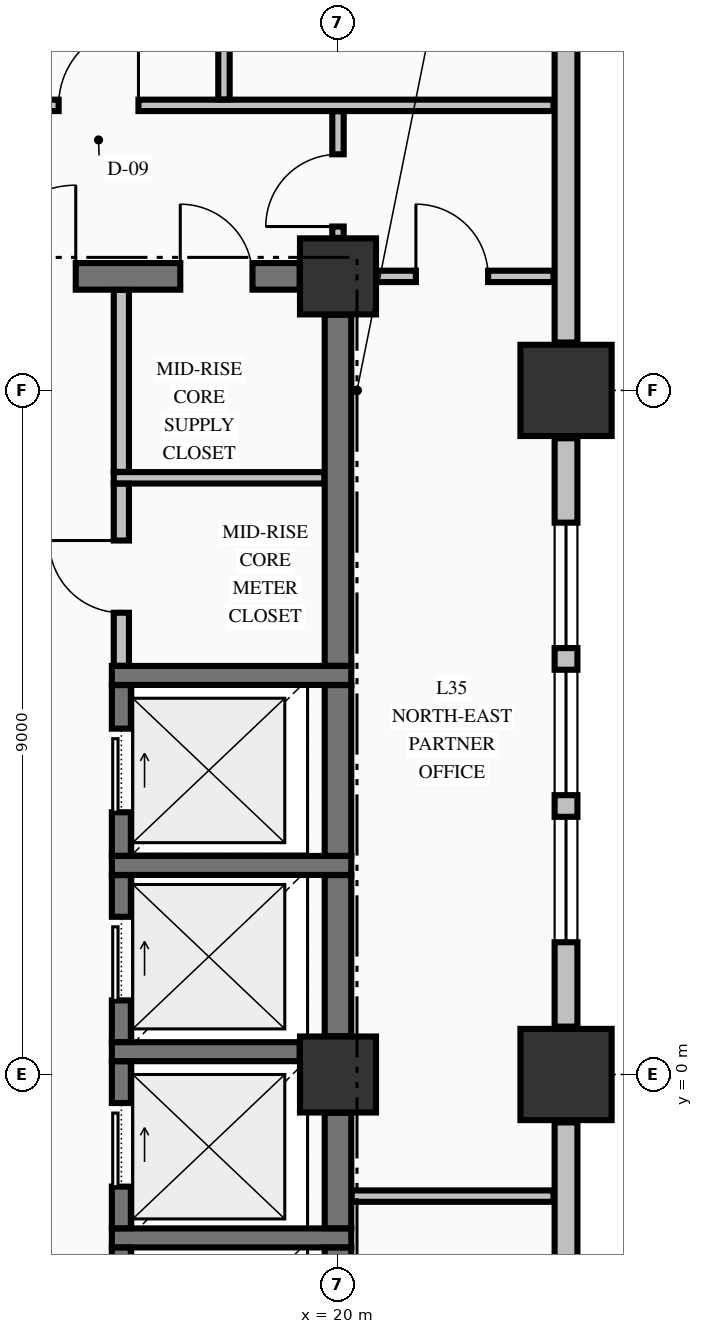
"""IFC4 building model, lengths in metres.
Left out: names, types, materials, properties, quantities, classifications, styles, units other than length and angle.
Written with IfcOpenShell. Run it as: python <this file> out.ifc"""

import sys

from ifc_helpers import new_model, si_unit, direction, frame, frame_2d, origin, origin_2d, place, context, subcontext, project, spatial, rectangle, extrude, element, fill, save


model = new_model("IFC4")
c1 = context("Model", 3, precision=1e-05, world=origin(), true_north=direction((0.0, 1.0)))
c2 = subcontext(c1, "Body", "Model", "MODEL_VIEW")
j1 = project(units=[si_unit("LENGTHUNIT", "METRE"), si_unit("PLANEANGLEUNIT", "RADIAN")], contexts=[c1])
p1 = place(None, origin())
s1 = spatial("IfcSite", under=j1, at=p1, CompositionType="ELEMENT")
p2 = place(p1, origin())
s2 = spatial("IfcBuilding", under=s1, at=p2, CompositionType="ELEMENT")
p3 = place(p2, frame((0.0, 0.0, 139.2)))
s3 = spatial("IfcBuildingStorey", under=s2, at=p3, CompositionType="ELEMENT", Elevation=139.2)
for number, where, z_axis, x_axis in (
    (1, (23.0, 0.0, -0.25), (0.0, 0.0, 1.0), (1.0, 0.0, 0.0)),
    (2, (23.0, 9.0, -0.25), (0.0, 0.0, 1.0), (1.0, 0.0, 0.0)),
):
    element("IfcColumn", number, at=place(p3, frame(where, z_axis=z_axis, x_axis=x_axis)), inside=s3, PredefinedType="COLUMN", context=c2, shape_type="SweptSolid", body=[
        extrude(rectangle(XDim=1.2, YDim=1.2, at=origin_2d()), origin(), (0.0, 0.0, 1.0), 3.495),
    ])
for number, where, z_axis, x_axis in (
    (3, (20.0, 10.5, -0.25), (0.0, 0.0, 1.0), (1.0, 0.0, 0.0)),
    (4, (20.0, 0.0, -0.25), (0.0, 0.0, 1.0), (1.0, 0.0, 0.0)),
):
    element("IfcColumn", number, at=place(p3, frame(where, z_axis=z_axis, x_axis=x_axis)), inside=s3, PredefinedType="COLUMN", context=c2, shape_type="SweptSolid", body=[
        extrude(rectangle(XDim=1.0, YDim=1.0, at=origin_2d()), origin(), (0.0, 0.0, 1.0), 3.495),
    ])
p4 = place(p3, frame((23.0, -8.37, 0.0), z_axis=(0.0, 0.0, 1.0), x_axis=(0.0, 1.0, 0.0)))
e5 = element("IfcWall", 5, at=p4, inside=s3, PredefinedType="STANDARD", context=c2, shape_type="SweptSolid", body=[
    extrude(rectangle(XDim=7.74, YDim=0.3, at=frame_2d((3.87, 0.0))), origin(), (0.0, 0.0, 1.0), 2.637),
])
p5 = place(p4, frame((1.11, 0.0, 0.8)))
e6 = element("IfcOpeningElement", 6, at=p5, cuts=e5, PredefinedType="OPENING", context=c2, shape_type="SweptSolid", body=[
    extrude(rectangle(XDim=1.65, YDim=1.7, at=frame_2d((0.825, 0.85))), frame((0.0, 0.16, 0.0), z_axis=(0.0, -1.0, 0.0), x_axis=(1.0, 0.0, 0.0)), (0.0, 0.0, 1.0), 0.32),
])
p6 = place(p4, frame((3.045, 0.0, 0.8)))
e7 = element("IfcOpeningElement", 7, at=p6, cuts=e5, PredefinedType="OPENING", context=c2, shape_type="SweptSolid", body=[
    extrude(rectangle(XDim=1.65, YDim=1.7, at=frame_2d((0.825, 0.85))), frame((0.0, 0.16, 0.0), z_axis=(0.0, -1.0, 0.0), x_axis=(1.0, 0.0, 0.0)), (0.0, 0.0, 1.0), 0.32),
])
p7 = place(p3, frame((23.0, 0.63, 0.0), z_axis=(0.0, 0.0, 1.0), x_axis=(0.0, 1.0, 0.0)))
e8 = element("IfcWall", 8, at=p7, inside=s3, PredefinedType="STANDARD", context=c2, shape_type="SweptSolid", body=[
    extrude(rectangle(XDim=7.74, YDim=0.3, at=frame_2d((3.87, 0.0))), origin(), (0.0, 0.0, 1.0), 2.637),
])
p8 = place(p7, frame((1.11, 0.0, 0.8)))
e9 = element("IfcOpeningElement", 9, at=p8, cuts=e8, PredefinedType="OPENING", context=c2, shape_type="SweptSolid", body=[
    extrude(rectangle(XDim=1.65, YDim=1.7, at=frame_2d((0.825, 0.85))), frame((0.0, 0.16, 0.0), z_axis=(0.0, -1.0, 0.0), x_axis=(1.0, 0.0, 0.0)), (0.0, 0.0, 1.0), 0.32),
])
p9 = place(p7, frame((3.045, 0.0, 0.8)))
e10 = element("IfcOpeningElement", 10, at=p9, cuts=e8, PredefinedType="OPENING", context=c2, shape_type="SweptSolid", body=[
    extrude(rectangle(XDim=1.65, YDim=1.7, at=frame_2d((0.825, 0.85))), frame((0.0, 0.16, 0.0), z_axis=(0.0, -1.0, 0.0), x_axis=(1.0, 0.0, 0.0)), (0.0, 0.0, 1.0), 0.32),
])
p10 = place(p7, frame((4.98, 0.0, 0.8)))
e11 = element("IfcOpeningElement", 11, at=p10, cuts=e8, PredefinedType="OPENING", context=c2, shape_type="SweptSolid", body=[
    extrude(rectangle(XDim=1.65, YDim=1.7, at=frame_2d((0.825, 0.85))), frame((0.0, 0.16, 0.0), z_axis=(0.0, -1.0, 0.0), x_axis=(1.0, 0.0, 0.0)), (0.0, 0.0, 1.0), 0.32),
])
p11 = place(p3, frame((23.0, 9.63, 0.0), z_axis=(0.0, 0.0, 1.0), x_axis=(0.0, 1.0, 0.0)))
e12 = element("IfcWall", 12, at=p11, inside=s3, PredefinedType="STANDARD", context=c2, shape_type="SweptSolid", body=[
    extrude(rectangle(XDim=10.74, YDim=0.3, at=frame_2d((5.37, 0.0))), origin(), (0.0, 0.0, 1.0), 2.637),
])
p12 = place(p3, frame((17.025, -2.15, 0.0), z_axis=(0.0, 0.0, 1.0), x_axis=(1.0, 0.0, 0.0)))
e13 = element("IfcWall", 13, at=p12, inside=s3, PredefinedType="SOLIDWALL", context=c2, shape_type="SweptSolid", body=[
    extrude(rectangle(XDim=3.15, YDim=0.25, at=frame_2d((1.575, 0.0))), origin(), (0.0, 0.0, 1.0), 3.245),
])
p13 = place(p3, frame((17.025, 0.3, 0.0), z_axis=(0.0, 0.0, 1.0), x_axis=(1.0, 0.0, 0.0)))
e14 = element("IfcWall", 14, at=p13, inside=s3, PredefinedType="SOLIDWALL", context=c2, shape_type="SweptSolid", body=[
    extrude(rectangle(XDim=2.471, YDim=0.25, at=frame_2d((1.236, 0.0))), origin(), (0.0, 0.0, 1.0), 3.245),
])
for number, where, z_axis, x_axis in (
    (15, (17.025, 2.75, 0.0), (0.0, 0.0, 1.0), (1.0, 0.0, 0.0)),
    (16, (17.025, 5.25, 0.0), (0.0, 0.0, 1.0), (1.0, 0.0, 0.0)),
):
    element("IfcWall", number, at=place(p3, frame(where, z_axis=z_axis, x_axis=x_axis)), inside=s3, PredefinedType="SOLIDWALL", context=c2, shape_type="SweptSolid", body=[
        extrude(rectangle(XDim=3.15, YDim=0.25, at=frame_2d((1.575, 0.0))), origin(), (0.0, 0.0, 1.0), 3.245),
    ])
p14 = place(p3, frame((14.7, 10.5, 0.0), z_axis=(0.0, 0.0, 1.0), x_axis=(1.0, 0.0, 0.0)))
e17 = element("IfcWall", 17, at=p14, inside=s3, PredefinedType="SHEAR", context=c2, shape_type="SweptSolid", body=[
    extrude(rectangle(XDim=4.796, YDim=0.35, at=frame_2d((2.398, 0.0))), origin(), (0.0, 0.0, 1.0), 3.245),
])
p15 = place(p14, frame((0.65, 0.0, 0.0)))
e18 = element("IfcOpeningElement", 18, at=p15, cuts=e17, PredefinedType="OPENING", context=c2, shape_type="SweptSolid", body=[
    extrude(rectangle(XDim=1.2, YDim=2.15, at=frame_2d((0.6, 1.075))), frame((0.0, 0.185, 0.0), z_axis=(0.0, -1.0, 0.0), x_axis=(1.0, 0.0, 0.0)), (0.0, 0.0, 1.0), 0.37),
])
p16 = place(p14, frame((3.225, 0.0, 0.0)))
e19 = element("IfcOpeningElement", 19, at=p16, cuts=e17, PredefinedType="OPENING", context=c2, shape_type="SweptSolid", body=[
    extrude(rectangle(XDim=0.95, YDim=2.15, at=frame_2d((0.475, 1.075))), frame((0.0, 0.185, 0.0), z_axis=(0.0, -1.0, 0.0), x_axis=(1.0, 0.0, 0.0)), (0.0, 0.0, 1.0), 0.37),
])
p17 = place(p3, frame((20.178, -1.6, 0.0), z_axis=(0.0, 0.0, 1.0), x_axis=(1.0, 0.0, 0.0)))
e20 = element("IfcWall", 20, at=p17, inside=s3, PredefinedType="PARTITIONING", context=c2, shape_type="SweptSolid", body=[
    extrude(rectangle(XDim=2.657, YDim=0.15, at=frame_2d((1.329, 0.0))), origin(), (0.0, 0.0, 1.0), 3.245),
])
p18 = place(p3, frame((17.05, 7.85, 0.0), z_axis=(0.0, 0.0, 1.0), x_axis=(1.0, 0.0, 0.0)))
e21 = element("IfcWall", 21, at=p18, inside=s3, PredefinedType="PARTITIONING", context=c2, shape_type="SweptSolid", body=[
    extrude(rectangle(XDim=2.772, YDim=0.15, at=frame_2d((1.386, 0.0))), origin(), (0.0, 0.0, 1.0), 3.245),
])
p19 = place(p3, frame((20.506, 10.5, 0.0), z_axis=(0.0, 0.0, 1.0), x_axis=(1.0, 0.0, 0.0)))
e22 = element("IfcWall", 22, at=p19, inside=s3, PredefinedType="PARTITIONING", context=c2, shape_type="SweptSolid", body=[
    extrude(rectangle(XDim=2.329, YDim=0.15, at=frame_2d((1.165, 0.0))), origin(), (0.0, 0.0, 1.0), 3.245),
])
p20 = place(p19, frame((0.519, 0.0, 0.0)))
e23 = element("IfcOpeningElement", 23, at=p20, cuts=e22, PredefinedType="OPENING", context=c2, shape_type="SweptSolid", body=[
    extrude(rectangle(XDim=0.95, YDim=2.15, at=frame_2d((0.475, 1.075))), frame((0.0, 0.085, 0.0), z_axis=(0.0, -1.0, 0.0), x_axis=(1.0, 0.0, 0.0)), (0.0, 0.0, 1.0), 0.17),
])
p21 = place(p3, frame((-27.835, 12.75, 0.0), z_axis=(0.0, 0.0, 1.0), x_axis=(1.0, 0.0, 0.0)))
e24 = element("IfcWall", 24, at=p21, inside=s3, PredefinedType="PARTITIONING", context=c2, shape_type="SweptSolid", body=[
    extrude(rectangle(XDim=50.67, YDim=0.15, at=frame_2d((25.335, 0.0))), origin(), (0.0, 0.0, 1.0), 3.245),
])
p22 = place(p21, frame((19.03, 0.0, 0.0)))
e25 = element("IfcOpeningElement", 25, at=p22, cuts=e24, PredefinedType="OPENING", context=c2, shape_type="SweptSolid", body=[
    extrude(rectangle(XDim=1.05, YDim=2.15, at=frame_2d((0.525, 1.075))), frame((0.0, 0.085, 0.0), z_axis=(0.0, -1.0, 0.0), x_axis=(1.0, 0.0, 0.0)), (0.0, 0.0, 1.0), 0.17),
])
p23 = place(p21, frame((44.16, 0.0, 0.0)))
e26 = element("IfcOpeningElement", 26, at=p23, cuts=e24, PredefinedType="OPENING", context=c2, shape_type="SweptSolid", body=[
    extrude(rectangle(XDim=1.05, YDim=2.15, at=frame_2d((0.525, 1.075))), frame((0.0, 0.085, 0.0), z_axis=(0.0, -1.0, 0.0), x_axis=(1.0, 0.0, 0.0)), (0.0, 0.0, 1.0), 0.17),
])
p24 = place(p3, frame((17.15, -4.423, 0.0), z_axis=(0.0, 0.0, 1.0), x_axis=(0.0, 1.0, 0.0)))
e27 = element("IfcWall", 27, at=p24, inside=s3, PredefinedType="SOLIDWALL", context=c2, shape_type="SweptSolid", body=[
    extrude(rectangle(XDim=2.146, YDim=0.25, at=frame_2d((1.073, 0.0))), origin(), (0.0, 0.0, 1.0), 3.245),
])
p25 = place(p24, frame((0.523, 0.0, 0.0)))
e28 = element("IfcOpeningElement", 28, at=p25, cuts=e27, PredefinedType="OPENING", context=c2, shape_type="SweptSolid", body=[
    extrude(rectangle(XDim=1.1, YDim=2.2, at=frame_2d((0.55, 1.1))), frame((0.0, 0.135, 0.0), z_axis=(0.0, -1.0, 0.0), x_axis=(1.0, 0.0, 0.0)), (0.0, 0.0, 1.0), 0.27),
])
p26 = place(p3, frame((17.15, -2.023, 0.0), z_axis=(0.0, 0.0, 1.0), x_axis=(0.0, 1.0, 0.0)))
e29 = element("IfcWall", 29, at=p26, inside=s3, PredefinedType="SOLIDWALL", context=c2, shape_type="SweptSolid", body=[
    extrude(rectangle(XDim=2.196, YDim=0.25, at=frame_2d((1.098, 0.0))), origin(), (0.0, 0.0, 1.0), 3.245),
])
p27 = place(p26, frame((0.548, 0.0, 0.0)))
e30 = element("IfcOpeningElement", 30, at=p27, cuts=e29, PredefinedType="OPENING", context=c2, shape_type="SweptSolid", body=[
    extrude(rectangle(XDim=1.1, YDim=2.2, at=frame_2d((0.55, 1.1))), frame((0.0, 0.135, 0.0), z_axis=(0.0, -1.0, 0.0), x_axis=(1.0, 0.0, 0.0)), (0.0, 0.0, 1.0), 0.27),
])
p28 = place(p3, frame((17.15, 0.427, 0.0), z_axis=(0.0, 0.0, 1.0), x_axis=(0.0, 1.0, 0.0)))
e31 = element("IfcWall", 31, at=p28, inside=s3, PredefinedType="SOLIDWALL", context=c2, shape_type="SweptSolid", body=[
    extrude(rectangle(XDim=2.196, YDim=0.25, at=frame_2d((1.098, 0.0))), origin(), (0.0, 0.0, 1.0), 3.245),
])
p29 = place(p28, frame((0.548, 0.0, 0.0)))
e32 = element("IfcOpeningElement", 32, at=p29, cuts=e31, PredefinedType="OPENING", context=c2, shape_type="SweptSolid", body=[
    extrude(rectangle(XDim=1.1, YDim=2.2, at=frame_2d((0.55, 1.1))), frame((0.0, 0.135, 0.0), z_axis=(0.0, -1.0, 0.0), x_axis=(1.0, 0.0, 0.0)), (0.0, 0.0, 1.0), 0.27),
])
p30 = place(p3, frame((17.15, 2.877, 0.0), z_axis=(0.0, 0.0, 1.0), x_axis=(0.0, 1.0, 0.0)))
e33 = element("IfcWall", 33, at=p30, inside=s3, PredefinedType="SOLIDWALL", context=c2, shape_type="SweptSolid", body=[
    extrude(rectangle(XDim=2.246, YDim=0.25, at=frame_2d((1.123, 0.0))), origin(), (0.0, 0.0, 1.0), 3.245),
])
p31 = place(p30, frame((0.573, 0.0, 0.0)))
e34 = element("IfcOpeningElement", 34, at=p31, cuts=e33, PredefinedType="OPENING", context=c2, shape_type="SweptSolid", body=[
    extrude(rectangle(XDim=1.1, YDim=2.2, at=frame_2d((0.55, 1.1))), frame((0.0, 0.135, 0.0), z_axis=(0.0, -1.0, 0.0), x_axis=(1.0, 0.0, 0.0)), (0.0, 0.0, 1.0), 0.27),
])
p32 = place(p3, frame((20.0, -4.423, 0.0), z_axis=(0.0, 0.0, 1.0), x_axis=(0.0, 1.0, 0.0)))
e35 = element("IfcWall", 35, at=p32, inside=s3, PredefinedType="SHEAR", context=c2, shape_type="SweptSolid", body=[
    extrude(rectangle(XDim=2.146, YDim=0.35, at=frame_2d((1.073, 0.0))), origin(), (0.0, 0.0, 1.0), 3.245),
])
p33 = place(p3, frame((20.0, -2.023, 0.0), z_axis=(0.0, 0.0, 1.0), x_axis=(0.0, 1.0, 0.0)))
e36 = element("IfcWall", 36, at=p33, inside=s3, PredefinedType="SHEAR", context=c2, shape_type="SweptSolid", body=[
    extrude(rectangle(XDim=1.519, YDim=0.35, at=frame_2d((0.76, 0.0))), origin(), (0.0, 0.0, 1.0), 3.245),
])
p34 = place(p3, frame((20.0, 0.504, 0.0), z_axis=(0.0, 0.0, 1.0), x_axis=(0.0, 1.0, 0.0)))
e37 = element("IfcWall", 37, at=p34, inside=s3, PredefinedType="SHEAR", context=c2, shape_type="SweptSolid", body=[
    extrude(rectangle(XDim=2.119, YDim=0.35, at=frame_2d((1.06, 0.0))), origin(), (0.0, 0.0, 1.0), 3.245),
])
p35 = place(p3, frame((20.0, 2.877, 0.0), z_axis=(0.0, 0.0, 1.0), x_axis=(0.0, 1.0, 0.0)))
e38 = element("IfcWall", 38, at=p35, inside=s3, PredefinedType="SHEAR", context=c2, shape_type="SweptSolid", body=[
    extrude(rectangle(XDim=2.246, YDim=0.35, at=frame_2d((1.123, 0.0))), origin(), (0.0, 0.0, 1.0), 3.245),
])
p36 = place(p3, frame((20.0, 5.377, 0.0), z_axis=(0.0, 0.0, 1.0), x_axis=(0.0, 1.0, 0.0)))
e39 = element("IfcWall", 39, at=p36, inside=s3, PredefinedType="SHEAR", context=c2, shape_type="SweptSolid", body=[
    extrude(rectangle(XDim=4.619, YDim=0.35, at=frame_2d((2.31, 0.0))), origin(), (0.0, 0.0, 1.0), 3.245),
])
p37 = place(p3, frame((17.15, 5.378, 0.0), z_axis=(0.0, 0.0, 1.0), x_axis=(0.0, 1.0, 0.0)))
e40 = element("IfcWall", 40, at=p37, inside=s3, PredefinedType="PARTITIONING", context=c2, shape_type="SweptSolid", body=[
    extrude(rectangle(XDim=2.394, YDim=0.2, at=frame_2d((1.197, 0.0))), origin(), (0.0, 0.0, 1.0), 3.245),
])
p38 = place(p37, frame((0.697, 0.0, 0.0)))
e41 = element("IfcOpeningElement", 41, at=p38, cuts=e40, PredefinedType="OPENING", context=c2, shape_type="SweptSolid", body=[
    extrude(rectangle(XDim=0.95, YDim=2.15, at=frame_2d((0.475, 1.075))), frame((0.0, 0.11, 0.0), z_axis=(0.0, -1.0, 0.0), x_axis=(1.0, 0.0, 0.0)), (0.0, 0.0, 1.0), 0.22),
])
p39 = place(p3, frame((17.15, 7.928, 0.0), z_axis=(0.0, 0.0, 1.0), x_axis=(0.0, 1.0, 0.0)))
e42 = element("IfcWall", 42, at=p39, inside=s3, PredefinedType="PARTITIONING", context=c2, shape_type="SweptSolid", body=[
    extrude(rectangle(XDim=2.394, YDim=0.2, at=frame_2d((1.197, 0.0))), origin(), (0.0, 0.0, 1.0), 3.245),
])
p40 = place(p3, frame((18.5, 12.828, 0.0), z_axis=(0.0, 0.0, 1.0), x_axis=(0.0, 1.0, 0.0)))
e43 = element("IfcWall", 43, at=p40, inside=s3, PredefinedType="PARTITIONING", context=c2, shape_type="SweptSolid", body=[
    extrude(rectangle(XDim=7.566, YDim=0.15, at=frame_2d((3.783, 0.0))), origin(), (0.0, 0.0, 1.0), 3.245),
])
p41 = place(p3, frame((20.0, 11.006, 0.0), z_axis=(0.0, 0.0, 1.0), x_axis=(0.0, 1.0, 0.0)))
e44 = element("IfcWall", 44, at=p41, inside=s3, PredefinedType="PARTITIONING", context=c2, shape_type="SweptSolid", body=[
    extrude(rectangle(XDim=1.666, YDim=0.15, at=frame_2d((0.833, 0.0))), origin(), (0.0, 0.0, 1.0), 2.735),
])
p42 = place(p41, frame((0.15, 0.0, 0.0)))
e45 = element("IfcOpeningElement", 45, at=p42, cuts=e44, PredefinedType="OPENING", context=c2, shape_type="SweptSolid", body=[
    extrude(rectangle(XDim=0.95, YDim=2.15, at=frame_2d((0.475, 1.075))), frame((0.0, 0.085, 0.0), z_axis=(0.0, -1.0, 0.0), x_axis=(1.0, 0.0, 0.0)), (0.0, 0.0, 1.0), 0.17),
])
p43 = place(p8, origin())
e46 = element("IfcWindow", 46, at=p43, inside=s3, PartitioningType="SINGLE_PANEL", PredefinedType="WINDOW", context=c2, shape_type="SweptSolid", body=[
    extrude(rectangle(XDim=1.65, YDim=1.7, at=frame_2d((0.825, 0.85))), frame((0.0, 0.03, 0.0), z_axis=(0.0, -1.0, 0.0), x_axis=(1.0, 0.0, 0.0)), (0.0, 0.0, 1.0), 0.06),
])
fill(e9, e46)
p44 = place(p9, origin())
e47 = element("IfcWindow", 47, at=p44, inside=s3, PartitioningType="SINGLE_PANEL", PredefinedType="WINDOW", context=c2, shape_type="SweptSolid", body=[
    extrude(rectangle(XDim=1.65, YDim=1.7, at=frame_2d((0.825, 0.85))), frame((0.0, 0.03, 0.0), z_axis=(0.0, -1.0, 0.0), x_axis=(1.0, 0.0, 0.0)), (0.0, 0.0, 1.0), 0.06),
])
fill(e10, e47)
p45 = place(p10, origin())
e48 = element("IfcWindow", 48, at=p45, inside=s3, PartitioningType="SINGLE_PANEL", PredefinedType="WINDOW", context=c2, shape_type="SweptSolid", body=[
    extrude(rectangle(XDim=1.65, YDim=1.7, at=frame_2d((0.825, 0.85))), frame((0.0, 0.03, 0.0), z_axis=(0.0, -1.0, 0.0), x_axis=(1.0, 0.0, 0.0)), (0.0, 0.0, 1.0), 0.06),
])
fill(e11, e48)
p46 = place(p27, origin())
e49 = element("IfcDoor", 49, at=p46, inside=s3, OperationType="SLIDING_TO_RIGHT", PredefinedType="DOOR", context=c2, shape_type="SweptSolid", body=[
    extrude(rectangle(XDim=1.1, YDim=2.2, at=frame_2d((0.55, 1.1))), frame((0.0, 0.025, 0.0), z_axis=(0.0, -1.0, 0.0), x_axis=(1.0, 0.0, 0.0)), (0.0, 0.0, 1.0), 0.05),
])
fill(e30, e49)
p47 = place(p29, origin())
e50 = element("IfcDoor", 50, at=p47, inside=s3, OperationType="SLIDING_TO_RIGHT", PredefinedType="DOOR", context=c2, shape_type="SweptSolid", body=[
    extrude(rectangle(XDim=1.1, YDim=2.2, at=frame_2d((0.55, 1.1))), frame((0.0, 0.025, 0.0), z_axis=(0.0, -1.0, 0.0), x_axis=(1.0, 0.0, 0.0)), (0.0, 0.0, 1.0), 0.05),
])
fill(e32, e50)
p48 = place(p31, origin())
e51 = element("IfcDoor", 51, at=p48, inside=s3, OperationType="SLIDING_TO_RIGHT", PredefinedType="DOOR", context=c2, shape_type="SweptSolid", body=[
    extrude(rectangle(XDim=1.1, YDim=2.2, at=frame_2d((0.55, 1.1))), frame((0.0, 0.025, 0.0), z_axis=(0.0, -1.0, 0.0), x_axis=(1.0, 0.0, 0.0)), (0.0, 0.0, 1.0), 0.05),
])
fill(e34, e51)
p49 = place(p15, origin())
e52 = element("IfcDoor", 52, at=p49, inside=s3, OperationType="SINGLE_SWING_RIGHT", PredefinedType="DOOR", context=c2, shape_type="SweptSolid", body=[
    extrude(rectangle(XDim=1.2, YDim=2.15, at=frame_2d((0.6, 1.075))), frame((0.0, 0.025, 0.0), z_axis=(0.0, -1.0, 0.0), x_axis=(1.0, 0.0, 0.0)), (0.0, 0.0, 1.0), 0.05),
])
fill(e18, e52)
p50 = place(p16, origin())
e53 = element("IfcDoor", 53, at=p50, inside=s3, OperationType="SINGLE_SWING_LEFT", PredefinedType="DOOR", context=c2, shape_type="SweptSolid", body=[
    extrude(rectangle(XDim=0.95, YDim=2.15, at=frame_2d((0.475, 1.075))), frame((0.0, 0.025, 0.0), z_axis=(0.0, -1.0, 0.0), x_axis=(1.0, 0.0, 0.0)), (0.0, 0.0, 1.0), 0.05),
])
fill(e19, e53)
p51 = place(p38, origin())
e54 = element("IfcDoor", 54, at=p51, inside=s3, OperationType="SINGLE_SWING_RIGHT", PredefinedType="DOOR", context=c2, shape_type="SweptSolid", body=[
    extrude(rectangle(XDim=0.95, YDim=2.15, at=frame_2d((0.475, 1.075))), frame((0.0, 0.025, 0.0), z_axis=(0.0, -1.0, 0.0), x_axis=(1.0, 0.0, 0.0)), (0.0, 0.0, 1.0), 0.05),
])
fill(e41, e54)
p52 = place(p23, origin())
e55 = element("IfcDoor", 55, at=p52, inside=s3, OperationType="SINGLE_SWING_RIGHT", PredefinedType="DOOR", context=c2, shape_type="SweptSolid", body=[
    extrude(rectangle(XDim=1.05, YDim=2.15, at=frame_2d((0.525, 1.075))), frame((0.0, 0.025, 0.0), z_axis=(0.0, -1.0, 0.0), x_axis=(1.0, 0.0, 0.0)), (0.0, 0.0, 1.0), 0.05),
])
fill(e26, e55)
p53 = place(p42, origin())
e56 = element("IfcDoor", 56, at=p53, inside=s3, OperationType="SINGLE_SWING_LEFT", PredefinedType="DOOR", context=c2, shape_type="SweptSolid", body=[
    extrude(rectangle(XDim=0.95, YDim=2.15, at=frame_2d((0.475, 1.075))), frame((0.0, 0.025, 0.0), z_axis=(0.0, -1.0, 0.0), x_axis=(1.0, 0.0, 0.0)), (0.0, 0.0, 1.0), 0.05),
])
fill(e45, e56)
p54 = place(p20, origin())
e57 = element("IfcDoor", 57, at=p54, inside=s3, OperationType="SINGLE_SWING_LEFT", PredefinedType="DOOR", context=c2, shape_type="SweptSolid", body=[
    extrude(rectangle(XDim=0.95, YDim=2.15, at=frame_2d((0.475, 1.075))), frame((0.0, 0.025, 0.0), z_axis=(0.0, -1.0, 0.0), x_axis=(1.0, 0.0, 0.0)), (0.0, 0.0, 1.0), 0.05),
])
fill(e23, e57)
save(model, sys.argv[1])
